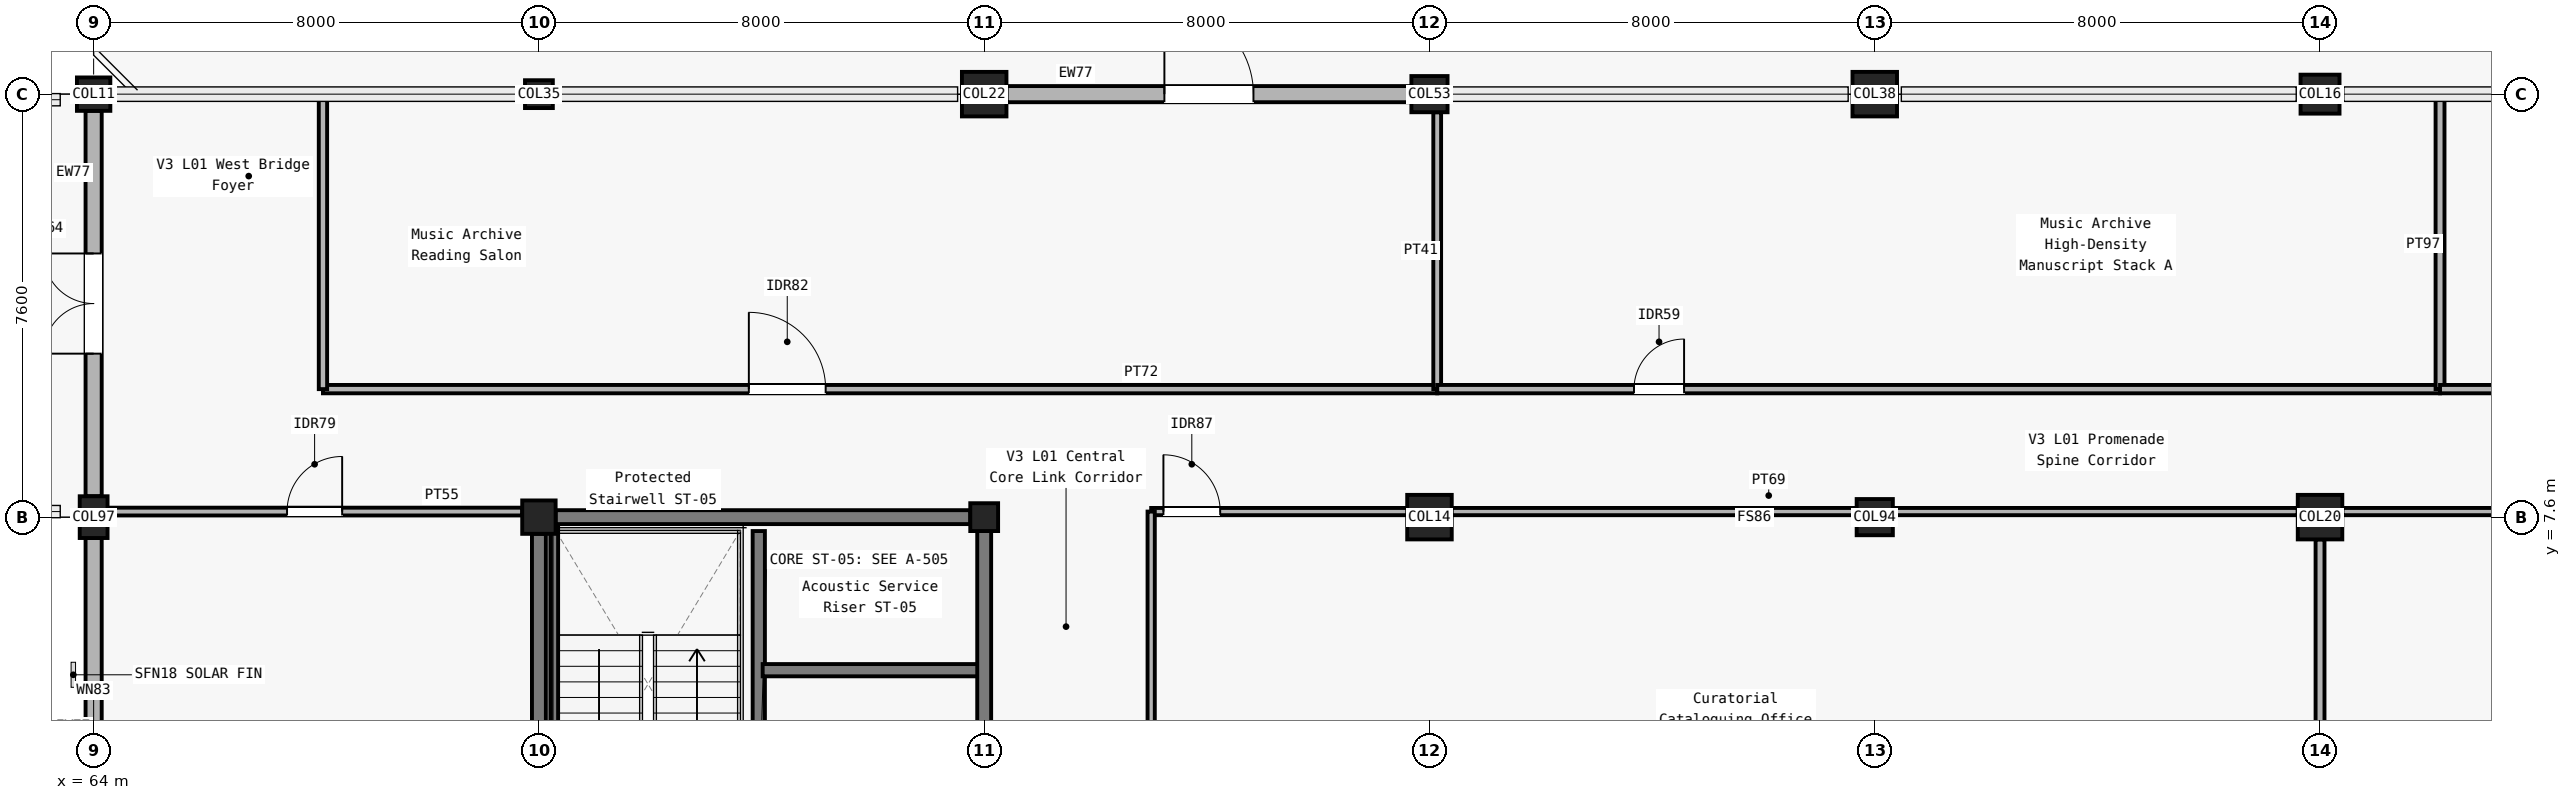
"""IFC4 building model, lengths in metres.
Left out: names, types, materials, properties, quantities, classifications, styles, units other than length and angle.
Written with IfcOpenShell. Run it as: python <this file> out.ifc"""

import sys

from ifc_helpers import new_model, si_unit, direction, frame, frame_2d, origin, origin_2d, place, context, subcontext, project, spatial, rectangle, circle, extrude, element, fill, save


model = new_model("IFC4")
c1 = context("Model", 3, precision=1e-05, world=origin(), true_north=direction((0.0, 1.0)))
c2 = subcontext(c1, "Body", "Model", "MODEL_VIEW")
j1 = project(units=[si_unit("LENGTHUNIT", "METRE"), si_unit("PLANEANGLEUNIT", "RADIAN")], contexts=[c1])
p1 = place(None, origin())
s1 = spatial("IfcSite", under=j1, at=p1, CompositionType="ELEMENT")
p2 = place(p1, origin())
s2 = spatial("IfcBuilding", under=s1, at=p2, CompositionType="ELEMENT")
p3 = place(p2, frame((0.0, 0.0, 5.4)))
s3 = spatial("IfcBuildingStorey", under=s2, at=p3, CompositionType="ELEMENT", Elevation=5.4)
p4 = place(p3, frame((64.0, 7.6, 0.0), z_axis=(0.0, 0.0, 1.0), x_axis=(1.0, 0.0, 0.0)))
e1 = element("IfcColumn", 1, at=p4, inside=s3, PredefinedType="COLUMN", context=c2, shape_type="SweptSolid", body=[
    extrude(rectangle(XDim=0.5, YDim=0.75, at=origin_2d()), origin(), (0.0, 0.0, 1.0), 4.8),
])
for number, where, z_axis, x_axis in (
    (2, (64.0, 15.2, 0.0), (0.0, 0.0, 1.0), (1.0, 0.0, 0.0)),
    (3, (72.0, 7.6, 0.0), (0.0, 0.0, 1.0), (1.0, 0.0, 0.0)),
):
    element("IfcColumn", number, at=place(p3, frame(where, z_axis=z_axis, x_axis=x_axis)), inside=s3, PredefinedType="COLUMN", context=c2, shape_type="SweptSolid", body=[
        extrude(rectangle(XDim=0.6, YDim=0.6, at=origin_2d()), origin(), (0.0, 0.0, 1.0), 4.8),
    ])
for number, where, z_axis, x_axis in (
    (4, (72.0, 15.2, 0.0), (0.0, 0.0, 1.0), (1.0, 0.0, 0.0)),
    (5, (80.0, 7.6, 0.0), (0.0, 0.0, 1.0), (1.0, 0.0, 0.0)),
):
    element("IfcColumn", number, at=place(p3, frame(where, z_axis=z_axis, x_axis=x_axis)), inside=s3, PredefinedType="COLUMN", context=c2, shape_type="SweptSolid", body=[
        extrude(rectangle(XDim=0.5, YDim=0.5, at=origin_2d()), origin(), (0.0, 0.0, 1.0), 4.8),
    ])
for number, where, z_axis, x_axis in (
    (6, (80.0, 15.2, 0.0), (0.0, 0.0, 1.0), (1.0, 0.0, 0.0)),
    (7, (88.0, 7.6, 0.0), (0.0, 0.0, 1.0), (1.0, 0.0, 0.0)),
):
    element("IfcColumn", number, at=place(p3, frame(where, z_axis=z_axis, x_axis=x_axis)), inside=s3, PredefinedType="COLUMN", context=c2, shape_type="SweptSolid", body=[
        extrude(circle(Radius=0.4, at=origin_2d()), origin(), (0.0, 0.0, 1.0), 4.8),
    ])
for number, where, z_axis, x_axis in (
    (8, (88.0, 15.2, 0.0), (0.0, 0.0, 1.0), (1.0, 0.0, 0.0)),
    (9, (96.0, 7.6, 0.0), (0.0, 0.0, 1.0), (1.0, 0.0, 0.0)),
):
    element("IfcColumn", number, at=place(p3, frame(where, z_axis=z_axis, x_axis=x_axis)), inside=s3, PredefinedType="COLUMN", context=c2, shape_type="SweptSolid", body=[
        extrude(circle(Radius=0.325, at=origin_2d()), origin(), (0.0, 0.0, 1.0), 4.8),
    ])
for number, where, z_axis, x_axis in (
    (10, (96.0, 15.2, 0.0), (0.0, 0.0, 1.0), (1.0, 0.0, 0.0)),
    (11, (104.0, 7.6, 0.0), (0.0, 0.0, 1.0), (1.0, 0.0, 0.0)),
):
    element("IfcColumn", number, at=place(p3, frame(where, z_axis=z_axis, x_axis=x_axis)), inside=s3, PredefinedType="COLUMN", context=c2, shape_type="SweptSolid", body=[
        extrude(rectangle(XDim=0.8, YDim=0.8, at=origin_2d()), origin(), (0.0, 0.0, 1.0), 4.8),
    ])
p5 = place(p3, frame((104.0, 15.2, 0.0), z_axis=(0.0, 0.0, 1.0), x_axis=(1.0, 0.0, 0.0)))
e12 = element("IfcColumn", 12, at=p5, inside=s3, PredefinedType="COLUMN", context=c2, shape_type="SweptSolid", body=[
    extrude(rectangle(XDim=0.7, YDim=0.7, at=origin_2d()), origin(), (0.0, 0.0, 1.0), 4.8),
])
p6 = place(p3, frame((64.0, 0.45, 0.0), z_axis=(0.0, 0.0, 1.0), x_axis=(0.0, 1.0, 0.0)))
e13 = element("IfcWall", 13, at=p6, inside=s3, PredefinedType="SOLIDWALL", context=c2, shape_type="SweptSolid", body=[
    extrude(rectangle(XDim=6.775, YDim=0.29, at=frame_2d((3.388, 0.0))), origin(), (0.0, 0.0, 1.0), 4.14),
])
p7 = place(p6, frame((2.637, 0.0, 0.95)))
e14 = element("IfcOpeningElement", 14, at=p7, cuts=e13, PredefinedType="OPENING", context=c2, shape_type="SweptSolid", body=[
    extrude(rectangle(XDim=1.5, YDim=1.5, at=frame_2d((0.75, 0.75))), frame((0.0, 0.155, 0.0), z_axis=(0.0, -1.0, 0.0), x_axis=(1.0, 0.0, 0.0)), (0.0, 0.0, 1.0), 0.31),
])
p8 = place(p3, frame((64.0, 7.975, 0.0), z_axis=(0.0, 0.0, 1.0), x_axis=(0.0, 1.0, 0.0)))
e15 = element("IfcWall", 15, at=p8, inside=s3, PredefinedType="SOLIDWALL", context=c2, shape_type="SweptSolid", body=[
    extrude(rectangle(XDim=6.925, YDim=0.29, at=frame_2d((3.462, 0.0))), origin(), (0.0, 0.0, 1.0), 3.9),
])
p9 = place(p8, frame((2.562, 0.0, 0.0)))
e16 = element("IfcOpeningElement", 16, at=p9, cuts=e15, PredefinedType="OPENING", context=c2, shape_type="SweptSolid", body=[
    extrude(rectangle(XDim=1.8, YDim=2.25, at=frame_2d((0.9, 1.125))), frame((0.0, 0.155, 0.0), z_axis=(0.0, -1.0, 0.0), x_axis=(1.0, 0.0, 0.0)), (0.0, 0.0, 1.0), 0.31),
])
p10 = place(p3, frame((80.4, 15.2, 0.0), z_axis=(0.0, 0.0, 1.0), x_axis=(1.0, 0.0, 0.0)))
e17 = element("IfcWall", 17, at=p10, inside=s3, PredefinedType="SOLIDWALL", context=c2, shape_type="SweptSolid", body=[
    extrude(rectangle(XDim=7.275, YDim=0.29, at=frame_2d((3.638, 0.0))), origin(), (0.0, 0.0, 1.0), 3.85),
])
p11 = place(p10, frame((2.837, 0.0, 0.0)))
e18 = element("IfcOpeningElement", 18, at=p11, cuts=e17, PredefinedType="OPENING", context=c2, shape_type="SweptSolid", body=[
    extrude(rectangle(XDim=1.6, YDim=2.2, at=frame_2d((0.8, 1.1))), frame((0.0, 0.155, 0.0), z_axis=(0.0, -1.0, 0.0), x_axis=(1.0, 0.0, 0.0)), (0.0, 0.0, 1.0), 0.31),
])
p12 = place(p3, frame((72.0, 0.375, 0.0), z_axis=(0.0, 0.0, 1.0), x_axis=(0.0, 1.0, 0.0)))
e19 = element("IfcWall", 19, at=p12, inside=s3, PredefinedType="SOLIDWALL", context=c2, shape_type="SweptSolid", body=[
    extrude(rectangle(XDim=6.925, YDim=0.25, at=frame_2d((3.462, 0.0))), origin(), (0.0, 0.0, 1.0), 2.69),
])
p13 = place(p3, frame((72.3, 7.6, 0.0), z_axis=(0.0, 0.0, 1.0), x_axis=(1.0, 0.0, 0.0)))
e20 = element("IfcWall", 20, at=p13, inside=s3, PredefinedType="SOLIDWALL", context=c2, shape_type="SweptSolid", body=[
    extrude(rectangle(XDim=7.45, YDim=0.25, at=frame_2d((3.725, 0.0))), origin(), (0.0, 0.0, 1.0), 2.69),
])
p14 = place(p3, frame((75.95, 0.25, 0.0), z_axis=(0.0, 0.0, 1.0), x_axis=(0.0, 1.0, 0.0)))
e21 = element("IfcWall", 21, at=p14, inside=s3, PredefinedType="SOLIDWALL", context=c2, shape_type="SweptSolid", body=[
    extrude(rectangle(XDim=7.1, YDim=0.22, at=frame_2d((3.55, 0.0))), origin(), (0.0, 0.0, 1.0), 4.51),
])
p15 = place(p14, frame((0.35, 0.0, 0.0)))
e22 = element("IfcOpeningElement", 22, at=p15, cuts=e21, PredefinedType="OPENING", context=c2, shape_type="SweptSolid", body=[
    extrude(rectangle(XDim=1.2, YDim=2.15, at=frame_2d((0.6, 1.075))), frame((0.0, 0.12, 0.0), z_axis=(0.0, -1.0, 0.0), x_axis=(1.0, 0.0, 0.0)), (0.0, 0.0, 1.0), 0.24),
])
p16 = place(p3, frame((76.02, 4.85, 0.0), z_axis=(0.0, 0.0, 1.0), x_axis=(1.0, 0.0, 0.0)))
e23 = element("IfcWall", 23, at=p16, inside=s3, PredefinedType="SOLIDWALL", context=c2, shape_type="SweptSolid", body=[
    extrude(rectangle(XDim=3.93, YDim=0.22, at=frame_2d((1.965, 0.0))), origin(), (0.0, 0.0, 1.0), 3.865),
])
p17 = place(p3, frame((80.0, 0.3, 0.0), z_axis=(0.0, 0.0, 1.0), x_axis=(0.0, 1.0, 0.0)))
e24 = element("IfcWall", 24, at=p17, inside=s3, PredefinedType="SOLIDWALL", context=c2, shape_type="SweptSolid", body=[
    extrude(rectangle(XDim=7.05, YDim=0.25, at=frame_2d((3.525, 0.0))), origin(), (0.0, 0.0, 1.0), 3.735),
])
p18 = place(p17, frame((2.05, 0.0, 0.0)))
e25 = element("IfcOpeningElement", 25, at=p18, cuts=e24, PredefinedType="OPENING", context=c2, shape_type="SweptSolid", body=[
    extrude(rectangle(XDim=1.35, YDim=2.2, at=frame_2d((0.675, 1.1))), frame((0.0, 0.135, 0.0), z_axis=(0.0, -1.0, 0.0), x_axis=(1.0, 0.0, 0.0)), (0.0, 0.0, 1.0), 0.27),
])
p19 = place(p3, frame((68.12, 9.9, 0.0), z_axis=(0.0, 0.0, 1.0), x_axis=(1.0, 0.0, 0.0)))
e26 = element("IfcWall", 26, at=p19, inside=s3, PredefinedType="PARTITIONING", context=c2, shape_type="SweptSolid", body=[
    extrude(rectangle(XDim=20.019, YDim=0.15, at=frame_2d((10.009, 0.0))), origin(), (0.0, 0.0, 1.0), 3.735),
])
p20 = place(p19, frame((7.652, 0.0, 0.0)))
e27 = element("IfcOpeningElement", 27, at=p20, cuts=e26, PredefinedType="OPENING", context=c2, shape_type="SweptSolid", body=[
    extrude(rectangle(XDim=1.38, YDim=2.2, at=frame_2d((0.69, 1.1))), frame((0.0, 0.085, 0.0), z_axis=(0.0, -1.0, 0.0), x_axis=(1.0, 0.0, 0.0)), (0.0, 0.0, 1.0), 0.17),
])
p21 = place(p3, frame((88.139, 9.9, 0.0), z_axis=(0.0, 0.0, 1.0), x_axis=(0.0, 1.0, 0.0)))
e28 = element("IfcWall", 28, at=p21, inside=s3, PredefinedType="PARTITIONING", context=c2, shape_type="SweptSolid", body=[
    extrude(rectangle(XDim=4.975, YDim=0.14, at=frame_2d((2.488, 0.0))), origin(), (0.0, 0.0, 1.0), 3.735),
])
p22 = place(p3, frame((88.139, 9.9, 0.0), z_axis=(0.0, 0.0, 1.0), x_axis=(1.0, 0.0, 0.0)))
e29 = element("IfcWall", 29, at=p22, inside=s3, PredefinedType="PARTITIONING", context=c2, shape_type="SweptSolid", body=[
    extrude(rectangle(XDim=18.017, YDim=0.15, at=frame_2d((9.009, 0.0))), origin(), (0.0, 0.0, 1.0), 3.685),
])
p23 = place(p22, frame((3.535, 0.0, 0.0)))
e30 = element("IfcOpeningElement", 30, at=p23, cuts=e29, PredefinedType="OPENING", context=c2, shape_type="SweptSolid", body=[
    extrude(rectangle(XDim=0.9, YDim=2.05, at=frame_2d((0.45, 1.025))), frame((0.0, 0.085, 0.0), z_axis=(0.0, -1.0, 0.0), x_axis=(1.0, 0.0, 0.0)), (0.0, 0.0, 1.0), 0.17),
])
p24 = place(p3, frame((106.156, 9.9, 0.0), z_axis=(0.0, 0.0, 1.0), x_axis=(0.0, 1.0, 0.0)))
e31 = element("IfcWall", 31, at=p24, inside=s3, PredefinedType="PARTITIONING", context=c2, shape_type="SweptSolid", body=[
    extrude(rectangle(XDim=5.22, YDim=0.16, at=frame_2d((2.61, 0.0))), origin(), (0.0, 0.0, 1.0), 3.735),
])
p25 = place(p3, frame((106.156, 9.9, 0.0), z_axis=(0.0, 0.0, 1.0), x_axis=(1.0, 0.0, 0.0)))
e32 = element("IfcWall", 32, at=p25, inside=s3, PredefinedType="PARTITIONING", context=c2, shape_type="SweptSolid", body=[
    extrude(rectangle(XDim=19.018, YDim=0.15, at=frame_2d((9.509, 0.0))), origin(), (0.0, 0.0, 1.0), 3.81),
])
p26 = place(p25, frame((9.009, 0.0, 0.0)))
e33 = element("IfcOpeningElement", 33, at=p26, cuts=e32, PredefinedType="OPENING", context=c2, shape_type="SweptSolid", body=[
    extrude(rectangle(XDim=0.94, YDim=2.05, at=frame_2d((0.47, 1.025))), frame((0.0, 0.085, 0.0), z_axis=(0.0, -1.0, 0.0), x_axis=(1.0, 0.0, 0.0)), (0.0, 0.0, 1.0), 0.17),
])
p27 = place(p3, frame((68.12, 9.9, 0.0), z_axis=(0.0, 0.0, 1.0), x_axis=(0.0, 1.0, 0.0)))
e34 = element("IfcWall", 34, at=p27, inside=s3, PredefinedType="PARTITIONING", context=c2, shape_type="SweptSolid", body=[
    extrude(rectangle(XDim=5.22, YDim=0.15, at=frame_2d((2.61, 0.0))), origin(), (0.0, 0.0, 1.0), 2.69),
])
p28 = place(p3, frame((64.25, 7.7, 0.0), z_axis=(0.0, 0.0, 1.0), x_axis=(1.0, 0.0, 0.0)))
e35 = element("IfcWall", 35, at=p28, inside=s3, PredefinedType="PARTITIONING", context=c2, shape_type="SweptSolid", body=[
    extrude(rectangle(XDim=7.45, YDim=0.14, at=frame_2d((3.725, 0.0))), origin(), (0.0, 0.0, 1.0), 2.69),
])
p29 = place(p28, frame((3.225, 0.0, 0.0)))
e36 = element("IfcOpeningElement", 36, at=p29, cuts=e35, PredefinedType="OPENING", context=c2, shape_type="SweptSolid", body=[
    extrude(rectangle(XDim=0.99, YDim=2.1, at=frame_2d((0.495, 1.05))), frame((0.0, 0.08, 0.0), z_axis=(0.0, -1.0, 0.0), x_axis=(1.0, 0.0, 0.0)), (0.0, 0.0, 1.0), 0.16),
])
p30 = place(p3, frame((83.0, 7.7, 0.0), z_axis=(0.0, 0.0, 1.0), x_axis=(1.0, 0.0, 0.0)))
e37 = element("IfcWall", 37, at=p30, inside=s3, PredefinedType="PARTITIONING", context=c2, shape_type="SweptSolid", body=[
    extrude(rectangle(XDim=20.6, YDim=0.13, at=frame_2d((10.3, 0.0))), origin(), (0.0, 0.0, 1.0), 3.55),
])
p31 = place(p30, frame((0.22, 0.0, 0.0)))
e38 = element("IfcOpeningElement", 38, at=p31, cuts=e37, PredefinedType="OPENING", context=c2, shape_type="SweptSolid", body=[
    extrude(rectangle(XDim=1.02, YDim=2.1, at=frame_2d((0.51, 1.05))), frame((0.0, 0.075, 0.0), z_axis=(0.0, -1.0, 0.0), x_axis=(1.0, 0.0, 0.0)), (0.0, 0.0, 1.0), 0.15),
])
p32 = place(p3, frame((104.0, 0.325, 0.0), z_axis=(0.0, 0.0, 1.0), x_axis=(0.0, 1.0, 0.0)))
e39 = element("IfcWall", 39, at=p32, inside=s3, PredefinedType="PARTITIONING", context=c2, shape_type="SweptSolid", body=[
    extrude(rectangle(XDim=6.875, YDim=0.16, at=frame_2d((3.438, 0.0))), origin(), (0.0, 0.0, 1.0), 3.685),
])
p33 = place(p3, frame((104.4, 7.7, 0.0), z_axis=(0.0, 0.0, 1.0), x_axis=(1.0, 0.0, 0.0)))
e40 = element("IfcWall", 40, at=p33, inside=s3, PredefinedType="PARTITIONING", context=c2, shape_type="SweptSolid", body=[
    extrude(rectangle(XDim=15.3, YDim=0.13, at=frame_2d((7.65, 0.0))), origin(), (0.0, 0.0, 1.0), 3.65),
])
p34 = place(p33, frame((2.992, 0.0, 0.0)))
e41 = element("IfcOpeningElement", 41, at=p34, cuts=e40, PredefinedType="OPENING", context=c2, shape_type="SweptSolid", body=[
    extrude(rectangle(XDim=1.08, YDim=2.1, at=frame_2d((0.54, 1.05))), frame((0.0, 0.075, 0.0), z_axis=(0.0, -1.0, 0.0), x_axis=(1.0, 0.0, 0.0)), (0.0, 0.0, 1.0), 0.15),
])
p35 = place(p3, frame((83.0, 0.08, 0.0), z_axis=(0.0, 0.0, 1.0), x_axis=(0.0, 1.0, 0.0)))
e42 = element("IfcWall", 42, at=p35, inside=s3, PredefinedType="PARTITIONING", context=c2, shape_type="SweptSolid", body=[
    extrude(rectangle(XDim=7.62, YDim=0.13, at=frame_2d((3.81, 0.0))), origin(), (0.0, 0.0, 1.0), 3.735),
])
p36 = place(p3, frame((72.275, 0.15, 0.0), z_axis=(0.0, 0.0, 1.0), x_axis=(0.0, 1.0, 0.0)))
e43 = element("IfcWall", 43, at=p36, inside=s3, PredefinedType="SOLIDWALL", context=c2, shape_type="SweptSolid", body=[
    extrude(rectangle(XDim=7.3, YDim=0.14, at=frame_2d((3.65, 0.0))), origin(), (0.0, 0.0, 1.0), 4.51),
])
p37 = place(p7, origin())
e44 = element("IfcWindow", 44, at=p37, inside=s3, PartitioningType="SINGLE_PANEL", PredefinedType="WINDOW", context=c2, shape_type="SweptSolid", body=[
    extrude(rectangle(XDim=1.5, YDim=1.5, at=frame_2d((0.75, 0.75))), frame((0.0, 0.03, 0.0), z_axis=(0.0, -1.0, 0.0), x_axis=(1.0, 0.0, 0.0)), (0.0, 0.0, 1.0), 0.06),
])
fill(e14, e44)
p38 = place(p9, origin())
e45 = element("IfcDoor", 45, at=p38, inside=s3, OperationType="DOUBLE_DOOR_SINGLE_SWING", PredefinedType="DOOR", context=c2, shape_type="SweptSolid", body=[
    extrude(rectangle(XDim=1.8, YDim=2.25, at=frame_2d((0.9, 1.125))), frame((0.0, 0.025, 0.0), z_axis=(0.0, -1.0, 0.0), x_axis=(1.0, 0.0, 0.0)), (0.0, 0.0, 1.0), 0.05),
])
fill(e16, e45)
p39 = place(p11, origin())
e46 = element("IfcDoor", 46, at=p39, inside=s3, OperationType="SINGLE_SWING_LEFT", PredefinedType="DOOR", context=c2, shape_type="SweptSolid", body=[
    extrude(rectangle(XDim=1.6, YDim=2.2, at=frame_2d((0.8, 1.1))), frame((0.0, 0.025, 0.0), z_axis=(0.0, -1.0, 0.0), x_axis=(1.0, 0.0, 0.0)), (0.0, 0.0, 1.0), 0.05),
])
fill(e18, e46)
p40 = place(p20, origin())
e47 = element("IfcDoor", 47, at=p40, inside=s3, OperationType="SINGLE_SWING_LEFT", PredefinedType="DOOR", context=c2, shape_type="SweptSolid", body=[
    extrude(rectangle(XDim=1.38, YDim=2.2, at=frame_2d((0.69, 1.1))), frame((0.0, 0.025, 0.0), z_axis=(0.0, -1.0, 0.0), x_axis=(1.0, 0.0, 0.0)), (0.0, 0.0, 1.0), 0.05),
])
fill(e27, e47)
p41 = place(p23, origin())
e48 = element("IfcDoor", 48, at=p41, inside=s3, OperationType="SINGLE_SWING_RIGHT", PredefinedType="DOOR", context=c2, shape_type="SweptSolid", body=[
    extrude(rectangle(XDim=0.9, YDim=2.05, at=frame_2d((0.45, 1.025))), frame((0.0, 0.025, 0.0), z_axis=(0.0, -1.0, 0.0), x_axis=(1.0, 0.0, 0.0)), (0.0, 0.0, 1.0), 0.05),
])
fill(e30, e48)
p42 = place(p29, origin())
e49 = element("IfcDoor", 49, at=p42, inside=s3, OperationType="SINGLE_SWING_RIGHT", PredefinedType="DOOR", context=c2, shape_type="SweptSolid", body=[
    extrude(rectangle(XDim=0.99, YDim=2.1, at=frame_2d((0.495, 1.05))), frame((0.0, 0.025, 0.0), z_axis=(0.0, -1.0, 0.0), x_axis=(1.0, 0.0, 0.0)), (0.0, 0.0, 1.0), 0.05),
])
fill(e36, e49)
p43 = place(p31, origin())
e50 = element("IfcDoor", 50, at=p43, inside=s3, OperationType="SINGLE_SWING_LEFT", PredefinedType="DOOR", context=c2, shape_type="SweptSolid", body=[
    extrude(rectangle(XDim=1.02, YDim=2.1, at=frame_2d((0.51, 1.05))), frame((0.0, 0.025, 0.0), z_axis=(0.0, -1.0, 0.0), x_axis=(1.0, 0.0, 0.0)), (0.0, 0.0, 1.0), 0.05),
])
fill(e38, e50)
save(model, sys.argv[1])
